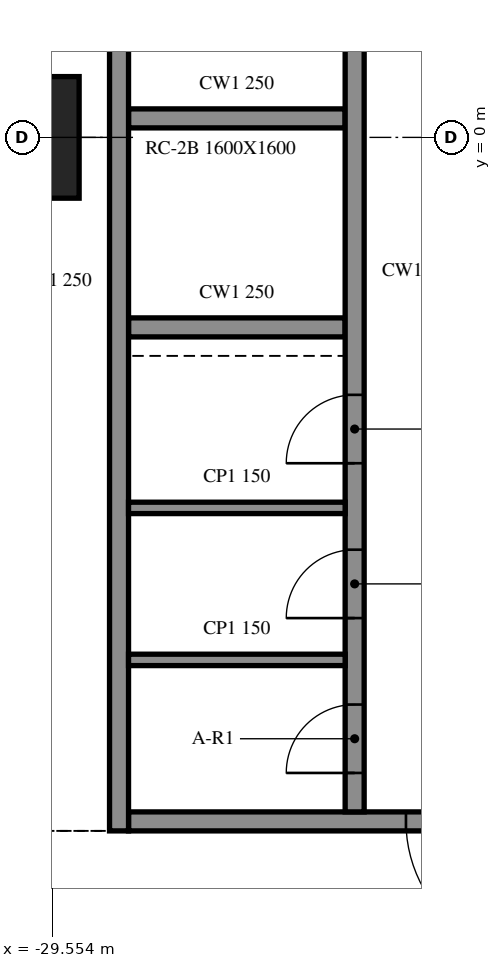
"""IFC4 building model, lengths in metres.
Left out: names, types, materials, properties, quantities, classifications, styles, units other than length and angle.
Written with IfcOpenShell. Run it as: python <this file> out.ifc"""

import sys

from ifc_helpers import new_model, si_unit, direction, frame, frame_2d, origin, origin_2d, place, context, subcontext, project, spatial, rectangle, extrude, element, fill, save


model = new_model("IFC4")
c1 = context("Model", 3, precision=1e-05, world=origin(), true_north=direction((0.0, 1.0)))
c2 = subcontext(c1, "Body", "Model", "MODEL_VIEW")
j1 = project(units=[si_unit("LENGTHUNIT", "METRE"), si_unit("PLANEANGLEUNIT", "RADIAN")], contexts=[c1])
p1 = place(None, origin())
s1 = spatial("IfcSite", under=j1, at=p1, CompositionType="ELEMENT")
p2 = place(p1, origin())
s2 = spatial("IfcBuilding", under=s1, at=p2, CompositionType="ELEMENT")
p3 = place(p2, frame((0.0, 0.0, 41.6)))
s3 = spatial("IfcBuildingStorey", under=s2, at=p3, CompositionType="ELEMENT", Elevation=41.6)
p4 = place(p3, frame((-30.0, 0.0, -0.55), z_axis=(0.0, 0.0, 1.0), x_axis=(1.0, 0.0, 0.0)))
e1 = element("IfcColumn", 1, at=p4, inside=s3, PredefinedType="COLUMN", context=c2, shape_type="SweptSolid", body=[
    extrude(rectangle(XDim=1.6, YDim=1.6, at=origin_2d()), origin(), (0.0, 0.0, 1.0), 4.61),
])
p5 = place(p3, frame((-28.675, 15.125, 0.0), z_axis=(0.0, 0.0, 1.0), x_axis=(0.0, -1.0, 0.0)))
e2 = element("IfcWall", 2, at=p5, inside=s3, PredefinedType="SOLIDWALL", context=c2, shape_type="SweptSolid", body=[
    extrude(rectangle(XDim=24.25, YDim=0.25, at=frame_2d((12.125, 0.0))), origin(), (0.0, 0.0, 1.0), 4.06),
])
p6 = place(p3, frame((-19.45, -9.0, 0.0), z_axis=(0.0, 0.0, 1.0), x_axis=(-1.0, 0.0, 0.0)))
e3 = element("IfcWall", 3, at=p6, inside=s3, PredefinedType="SOLIDWALL", context=c2, shape_type="SweptSolid", body=[
    extrude(rectangle(XDim=9.1, YDim=0.25, at=frame_2d((4.55, 0.0))), origin(), (0.0, 0.0, 1.0), 4.06),
])
p7 = place(p6, frame((3.65, 0.0, 0.0)))
e4 = element("IfcOpeningElement", 4, at=p7, cuts=e3, PredefinedType="OPENING", context=c2, shape_type="SweptSolid", body=[
    extrude(rectangle(XDim=1.8, YDim=2.1, at=frame_2d((0.9, 1.05))), frame((0.0, 0.135, 0.0), z_axis=(0.0, -1.0, 0.0), x_axis=(1.0, 0.0, 0.0)), (0.0, 0.0, 1.0), 0.27),
])
p8 = place(p3, frame((-25.575, -8.875, 0.0), z_axis=(0.0, 0.0, 1.0), x_axis=(0.0, 1.0, 0.0)))
e5 = element("IfcWall", 5, at=p8, inside=s3, PredefinedType="SOLIDWALL", context=c2, shape_type="SweptSolid", body=[
    extrude(rectangle(XDim=17.5, YDim=0.25, at=frame_2d((8.75, 0.0))), origin(), (0.0, 0.0, 1.0), 4.06),
])
p9 = place(p8, frame((0.512, 0.0, 0.0)))
e6 = element("IfcOpeningElement", 6, at=p9, cuts=e5, PredefinedType="OPENING", context=c2, shape_type="SweptSolid", body=[
    extrude(rectangle(XDim=0.9, YDim=2.1, at=frame_2d((0.45, 1.05))), frame((0.0, 0.135, 0.0), z_axis=(0.0, -1.0, 0.0), x_axis=(1.0, 0.0, 0.0)), (0.0, 0.0, 1.0), 0.27),
])
p10 = place(p8, frame((2.55, 0.0, 0.0)))
e7 = element("IfcOpeningElement", 7, at=p10, cuts=e5, PredefinedType="OPENING", context=c2, shape_type="SweptSolid", body=[
    extrude(rectangle(XDim=0.9, YDim=2.1, at=frame_2d((0.45, 1.05))), frame((0.0, 0.135, 0.0), z_axis=(0.0, -1.0, 0.0), x_axis=(1.0, 0.0, 0.0)), (0.0, 0.0, 1.0), 0.27),
])
p11 = place(p8, frame((4.587, 0.0, 0.0)))
e8 = element("IfcOpeningElement", 8, at=p11, cuts=e5, PredefinedType="OPENING", context=c2, shape_type="SweptSolid", body=[
    extrude(rectangle(XDim=0.9, YDim=2.1, at=frame_2d((0.45, 1.05))), frame((0.0, 0.135, 0.0), z_axis=(0.0, -1.0, 0.0), x_axis=(1.0, 0.0, 0.0)), (0.0, 0.0, 1.0), 0.27),
])
for number, where, z_axis, x_axis in (
    (9, (-28.55, -2.5, 0.0), (0.0, 0.0, 1.0), (1.0, 0.0, 0.0)),
    (10, (-28.55, 0.25, 0.0), (0.0, 0.0, 1.0), (1.0, 0.0, 0.0)),
):
    element("IfcWall", number, at=place(p3, frame(where, z_axis=z_axis, x_axis=x_axis)), inside=s3, PredefinedType="SOLIDWALL", context=c2, shape_type="SweptSolid", body=[
        extrude(rectangle(XDim=2.85, YDim=0.25, at=frame_2d((1.425, 0.0))), origin(), (0.0, 0.0, 1.0), 4.06),
    ])
for number, where, z_axis, x_axis in (
    (11, (-28.55, -6.875, 0.0), (0.0, 0.0, 1.0), (1.0, 0.0, 0.0)),
    (12, (-28.55, -4.875, 0.0), (0.0, 0.0, 1.0), (1.0, 0.0, 0.0)),
):
    element("IfcWall", number, at=place(p3, frame(where, z_axis=z_axis, x_axis=x_axis)), inside=s3, PredefinedType="PARTITIONING", context=c2, shape_type="SweptSolid", body=[
        extrude(rectangle(XDim=2.85, YDim=0.15, at=frame_2d((1.425, 0.0))), origin(), (0.0, 0.0, 1.0), 4.06),
    ])
p12 = place(p7, origin())
e13 = element("IfcDoor", 13, at=p12, inside=s3, OperationType="DOUBLE_DOOR_SINGLE_SWING", PredefinedType="DOOR", context=c2, shape_type="SweptSolid", body=[
    extrude(rectangle(XDim=1.8, YDim=2.1, at=frame_2d((0.9, 1.05))), frame((0.0, 0.025, 0.0), z_axis=(0.0, -1.0, 0.0), x_axis=(1.0, 0.0, 0.0)), (0.0, 0.0, 1.0), 0.05),
])
fill(e4, e13)
p13 = place(p9, origin())
e14 = element("IfcDoor", 14, at=p13, inside=s3, OperationType="SINGLE_SWING_LEFT", PredefinedType="DOOR", context=c2, shape_type="SweptSolid", body=[
    extrude(rectangle(XDim=0.9, YDim=2.1, at=frame_2d((0.45, 1.05))), frame((0.0, 0.025, 0.0), z_axis=(0.0, -1.0, 0.0), x_axis=(1.0, 0.0, 0.0)), (0.0, 0.0, 1.0), 0.05),
])
fill(e6, e14)
p14 = place(p10, origin())
e15 = element("IfcDoor", 15, at=p14, inside=s3, OperationType="SINGLE_SWING_RIGHT", PredefinedType="DOOR", context=c2, shape_type="SweptSolid", body=[
    extrude(rectangle(XDim=0.9, YDim=2.1, at=frame_2d((0.45, 1.05))), frame((0.0, 0.025, 0.0), z_axis=(0.0, -1.0, 0.0), x_axis=(1.0, 0.0, 0.0)), (0.0, 0.0, 1.0), 0.05),
])
fill(e7, e15)
p15 = place(p11, origin())
e16 = element("IfcDoor", 16, at=p15, inside=s3, OperationType="SINGLE_SWING_LEFT", PredefinedType="DOOR", context=c2, shape_type="SweptSolid", body=[
    extrude(rectangle(XDim=0.9, YDim=2.1, at=frame_2d((0.45, 1.05))), frame((0.0, 0.025, 0.0), z_axis=(0.0, -1.0, 0.0), x_axis=(1.0, 0.0, 0.0)), (0.0, 0.0, 1.0), 0.05),
])
fill(e8, e16)
save(model, sys.argv[1])
